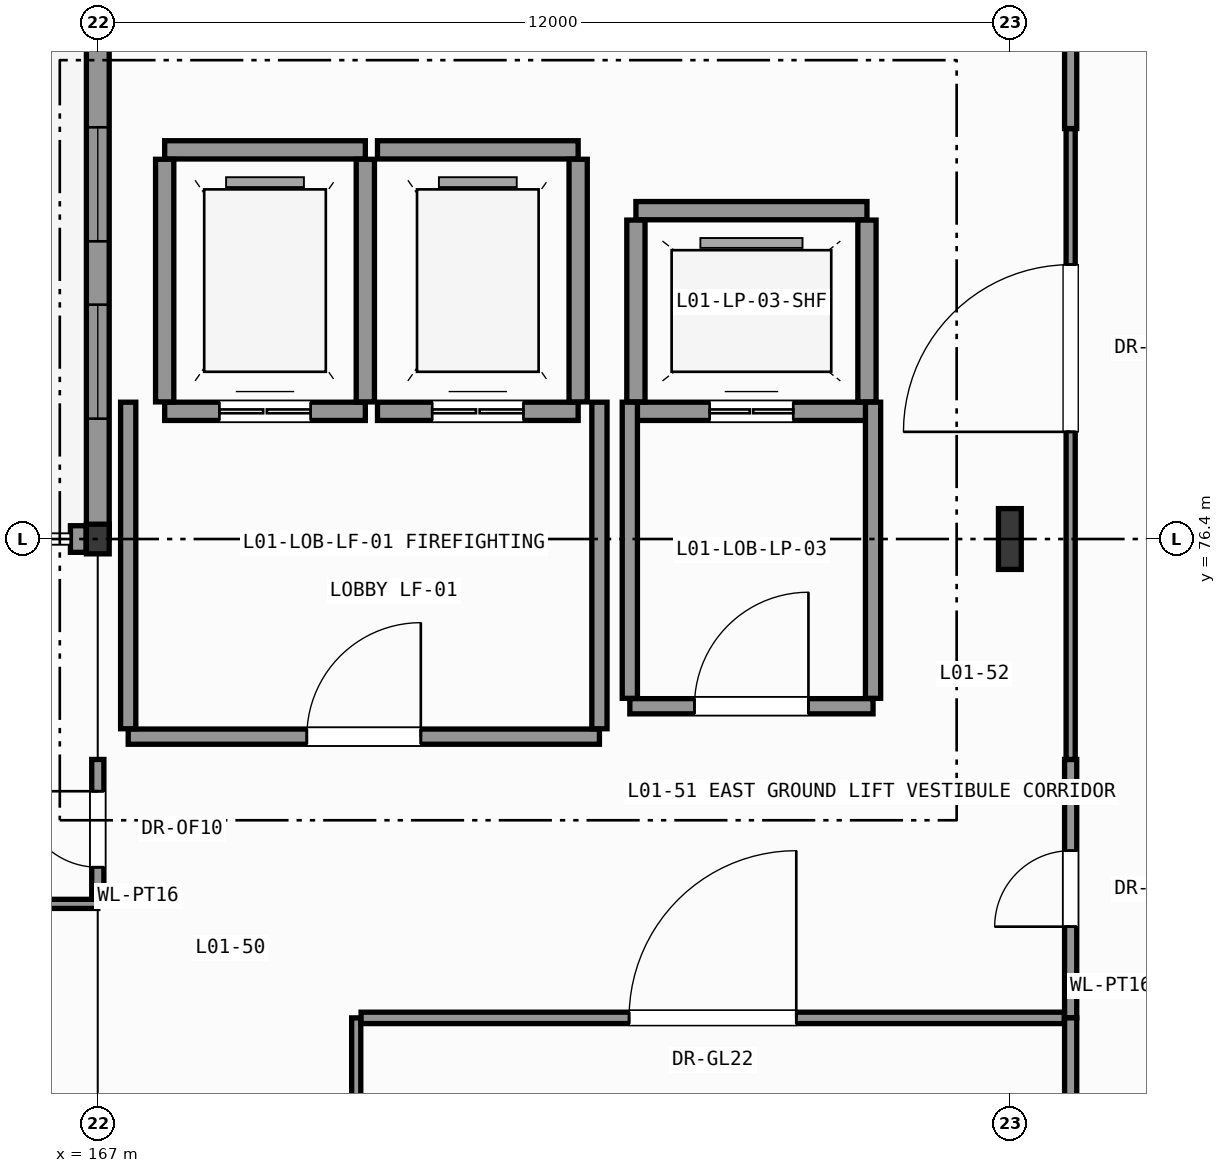
"""IFC4 building model, lengths in metres.
Left out: names, types, materials, properties, quantities, classifications, styles, units other than length and angle.
Written with IfcOpenShell. Run it as: python <this file> out.ifc"""

import sys

from ifc_helpers import new_model, si_unit, direction, frame, frame_2d, origin, origin_2d, place, context, subcontext, project, spatial, rectangle, i_section, extrude, element, fill, save


model = new_model("IFC4")
c1 = context("Model", 3, precision=1e-05, world=origin(), true_north=direction((0.0, 1.0)))
c2 = subcontext(c1, "Body", "Model", "MODEL_VIEW")
j1 = project(units=[si_unit("LENGTHUNIT", "METRE"), si_unit("PLANEANGLEUNIT", "RADIAN")], contexts=[c1])
p1 = place(None, origin())
s1 = spatial("IfcSite", under=j1, at=p1, CompositionType="ELEMENT")
p2 = place(p1, origin())
s2 = spatial("IfcBuilding", under=s1, at=p2, CompositionType="ELEMENT")
p3 = place(p2, origin())
s3 = spatial("IfcBuildingStorey", under=s2, at=p3, CompositionType="ELEMENT", Elevation=0.0)
p4 = place(p3, frame((167.0, 76.4, 0.0), z_axis=(0.0, 0.0, 1.0), x_axis=(1.0, 0.0, 0.0)))
e1 = element("IfcColumn", 1, at=p4, inside=s3, PredefinedType="COLUMN", context=c2, shape_type="SweptSolid", body=[
    extrude(i_section(OverallWidth=0.3, OverallDepth=0.39, WebThickness=0.011, FlangeThickness=0.019, FilletRadius=0.027, at=origin_2d()), origin(), (0.0, 0.0, 1.0), 7.8),
])
p5 = place(p3, frame((179.0, 76.4, 0.0), z_axis=(0.0, 0.0, 1.0), x_axis=(1.0, 0.0, 0.0)))
e2 = element("IfcColumn", 2, at=p5, inside=s3, PredefinedType="COLUMN", context=c2, shape_type="SweptSolid", body=[
    extrude(i_section(OverallWidth=0.3, OverallDepth=0.8, WebThickness=0.018, FlangeThickness=0.033, FilletRadius=0.03, at=origin_2d()), origin(), (0.0, 0.0, 1.0), 7.8),
])
p6 = place(p3, frame((167.0, 76.4, 0.0), z_axis=(0.0, 0.0, 1.0), x_axis=(0.0, 1.0, 0.0)))
e3 = element("IfcWall", 3, at=p6, inside=s3, PredefinedType="SOLIDWALL", context=c2, shape_type="SweptSolid", body=[
    extrude(rectangle(XDim=7.0, YDim=0.3, at=frame_2d((3.5, 0.0))), origin(), (0.0, 0.0, 1.0), 7.235),
])
p7 = place(p6, frame((1.583, 0.0, 0.95)))
e4 = element("IfcOpeningElement", 4, at=p7, cuts=e3, PredefinedType="OPENING", context=c2, shape_type="SweptSolid", body=[
    extrude(rectangle(XDim=1.5, YDim=2.4, at=frame_2d((0.75, 1.2))), frame((0.0, 0.16, 0.0), z_axis=(0.0, -1.0, 0.0), x_axis=(1.0, 0.0, 0.0)), (0.0, 0.0, 1.0), 0.32),
])
p8 = place(p6, frame((3.917, 0.0, 0.95)))
e5 = element("IfcOpeningElement", 5, at=p8, cuts=e3, PredefinedType="OPENING", context=c2, shape_type="SweptSolid", body=[
    extrude(rectangle(XDim=1.5, YDim=2.4, at=frame_2d((0.75, 1.2))), frame((0.0, 0.16, 0.0), z_axis=(0.0, -1.0, 0.0), x_axis=(1.0, 0.0, 0.0)), (0.0, 0.0, 1.0), 0.32),
])
p9 = place(p3, frame((166.846, 76.4, 0.0), z_axis=(0.0, 0.0, 1.0), x_axis=(-1.0, 0.0, 0.0)))
e6 = element("IfcWall", 6, at=p9, inside=s3, PredefinedType="SOLIDWALL", context=c2, shape_type="SweptSolid", body=[
    extrude(rectangle(XDim=0.206, YDim=0.35, at=frame_2d((0.103, 0.0))), origin(), (0.0, 0.0, 1.0), 7.54),
])
p10 = place(p3, frame((167.88, 78.08, 0.0), z_axis=(0.0, 0.0, 1.0), x_axis=(1.0, 0.0, 0.0)))
e7 = element("IfcWall", 7, at=p10, inside=s3, PredefinedType="SHEAR", context=c2, shape_type="SweptSolid", body=[
    extrude(rectangle(XDim=2.64, YDim=0.24, at=frame_2d((1.32, 0.0))), origin(), (0.0, 0.0, 1.0), 7.54),
])
p11 = place(p10, frame((0.72, 0.0, 0.0)))
e8 = element("IfcOpeningElement", 8, at=p11, cuts=e7, PredefinedType="OPENING", context=c2, shape_type="SweptSolid", body=[
    extrude(rectangle(XDim=1.2, YDim=2.2, at=frame_2d((0.6, 1.1))), frame((0.0, 0.13, 0.0), z_axis=(0.0, -1.0, 0.0), x_axis=(1.0, 0.0, 0.0)), (0.0, 0.0, 1.0), 0.26),
])
p12 = place(p3, frame((167.88, 81.52, 0.0), z_axis=(0.0, 0.0, 1.0), x_axis=(1.0, 0.0, 0.0)))
e9 = element("IfcWall", 9, at=p12, inside=s3, PredefinedType="SHEAR", context=c2, shape_type="SweptSolid", body=[
    extrude(rectangle(XDim=2.64, YDim=0.24, at=frame_2d((1.32, 0.0))), origin(), (0.0, 0.0, 1.0), 7.54),
])
for number, where, z_axis, x_axis in (
    (10, (167.88, 78.204, 0.0), (0.0, 0.0, 1.0), (0.0, 1.0, 0.0)),
    (11, (170.52, 78.204, 0.0), (0.0, 0.0, 1.0), (0.0, 1.0, 0.0)),
):
    element("IfcWall", number, at=place(p3, frame(where, z_axis=z_axis, x_axis=x_axis)), inside=s3, PredefinedType="SHEAR", context=c2, shape_type="SweptSolid", body=[
        extrude(rectangle(XDim=3.192, YDim=0.24, at=frame_2d((1.596, 0.0))), origin(), (0.0, 0.0, 1.0), 7.54),
    ])
p13 = place(p3, frame((170.68, 78.08, 0.0), z_axis=(0.0, 0.0, 1.0), x_axis=(1.0, 0.0, 0.0)))
e12 = element("IfcWall", 12, at=p13, inside=s3, PredefinedType="SHEAR", context=c2, shape_type="SweptSolid", body=[
    extrude(rectangle(XDim=2.64, YDim=0.24, at=frame_2d((1.32, 0.0))), origin(), (0.0, 0.0, 1.0), 7.54),
])
p14 = place(p13, frame((0.72, 0.0, 0.0)))
e13 = element("IfcOpeningElement", 13, at=p14, cuts=e12, PredefinedType="OPENING", context=c2, shape_type="SweptSolid", body=[
    extrude(rectangle(XDim=1.2, YDim=2.2, at=frame_2d((0.6, 1.1))), frame((0.0, 0.13, 0.0), z_axis=(0.0, -1.0, 0.0), x_axis=(1.0, 0.0, 0.0)), (0.0, 0.0, 1.0), 0.26),
])
p15 = place(p3, frame((170.68, 81.52, 0.0), z_axis=(0.0, 0.0, 1.0), x_axis=(1.0, 0.0, 0.0)))
e14 = element("IfcWall", 14, at=p15, inside=s3, PredefinedType="SHEAR", context=c2, shape_type="SweptSolid", body=[
    extrude(rectangle(XDim=2.64, YDim=0.24, at=frame_2d((1.32, 0.0))), origin(), (0.0, 0.0, 1.0), 7.54),
])
p16 = place(p3, frame((173.32, 78.204, 0.0), z_axis=(0.0, 0.0, 1.0), x_axis=(0.0, 1.0, 0.0)))
e15 = element("IfcWall", 15, at=p16, inside=s3, PredefinedType="SHEAR", context=c2, shape_type="SweptSolid", body=[
    extrude(rectangle(XDim=3.192, YDim=0.24, at=frame_2d((1.596, 0.0))), origin(), (0.0, 0.0, 1.0), 7.54),
])
p17 = place(p3, frame((174.08, 78.08, 0.0), z_axis=(0.0, 0.0, 1.0), x_axis=(1.0, 0.0, 0.0)))
e16 = element("IfcWall", 16, at=p17, inside=s3, PredefinedType="SHEAR", context=c2, shape_type="SweptSolid", body=[
    extrude(rectangle(XDim=3.04, YDim=0.24, at=frame_2d((1.52, 0.0))), origin(), (0.0, 0.0, 1.0), 7.54),
])
p18 = place(p17, frame((0.97, 0.0, 0.0)))
e17 = element("IfcOpeningElement", 17, at=p18, cuts=e16, PredefinedType="OPENING", context=c2, shape_type="SweptSolid", body=[
    extrude(rectangle(XDim=1.1, YDim=2.2, at=frame_2d((0.55, 1.1))), frame((0.0, 0.13, 0.0), z_axis=(0.0, -1.0, 0.0), x_axis=(1.0, 0.0, 0.0)), (0.0, 0.0, 1.0), 0.26),
])
p19 = place(p3, frame((174.08, 80.72, 0.0), z_axis=(0.0, 0.0, 1.0), x_axis=(1.0, 0.0, 0.0)))
e18 = element("IfcWall", 18, at=p19, inside=s3, PredefinedType="SHEAR", context=c2, shape_type="SweptSolid", body=[
    extrude(rectangle(XDim=3.04, YDim=0.24, at=frame_2d((1.52, 0.0))), origin(), (0.0, 0.0, 1.0), 7.54),
])
for number, where, z_axis, x_axis in (
    (19, (174.08, 78.204, 0.0), (0.0, 0.0, 1.0), (0.0, 1.0, 0.0)),
    (20, (177.12, 78.204, 0.0), (0.0, 0.0, 1.0), (0.0, 1.0, 0.0)),
):
    element("IfcWall", number, at=place(p3, frame(where, z_axis=z_axis, x_axis=x_axis)), inside=s3, PredefinedType="SHEAR", context=c2, shape_type="SweptSolid", body=[
        extrude(rectangle(XDim=2.392, YDim=0.24, at=frame_2d((1.196, 0.0))), origin(), (0.0, 0.0, 1.0), 7.54),
    ])
p20 = place(p3, frame((167.4, 73.8, 0.0), z_axis=(0.0, 0.0, 1.0), x_axis=(1.0, 0.0, 0.0)))
e21 = element("IfcWall", 21, at=p20, inside=s3, PredefinedType="PARTITIONING", context=c2, shape_type="SweptSolid", body=[
    extrude(rectangle(XDim=6.2, YDim=0.2, at=frame_2d((3.1, 0.0))), origin(), (0.0, 0.0, 1.0), 7.165),
])
p21 = place(p20, frame((2.35, 0.0, 0.0)))
e22 = element("IfcOpeningElement", 22, at=p21, cuts=e21, PredefinedType="OPENING", context=c2, shape_type="SweptSolid", body=[
    extrude(rectangle(XDim=1.5, YDim=2.2, at=frame_2d((0.75, 1.1))), frame((0.0, 0.11, 0.0), z_axis=(0.0, -1.0, 0.0), x_axis=(1.0, 0.0, 0.0)), (0.0, 0.0, 1.0), 0.22),
])
for number, where, z_axis, x_axis in (
    (23, (167.4, 73.904, 0.0), (0.0, 0.0, 1.0), (0.0, 1.0, 0.0)),
    (24, (173.6, 73.904, 0.0), (0.0, 0.0, 1.0), (0.0, 1.0, 0.0)),
):
    element("IfcWall", number, at=place(p3, frame(where, z_axis=z_axis, x_axis=x_axis)), inside=s3, PredefinedType="PARTITIONING", context=c2, shape_type="SweptSolid", body=[
        extrude(rectangle(XDim=4.296, YDim=0.2, at=frame_2d((2.148, 0.0))), origin(), (0.0, 0.0, 1.0), 7.54),
    ])
p22 = place(p3, frame((174.0, 74.2, 0.0), z_axis=(0.0, 0.0, 1.0), x_axis=(1.0, 0.0, 0.0)))
e25 = element("IfcWall", 25, at=p22, inside=s3, PredefinedType="PARTITIONING", context=c2, shape_type="SweptSolid", body=[
    extrude(rectangle(XDim=3.2, YDim=0.2, at=frame_2d((1.6, 0.0))), origin(), (0.0, 0.0, 1.0), 7.54),
])
p23 = place(p22, frame((0.85, 0.0, 0.0)))
e26 = element("IfcOpeningElement", 26, at=p23, cuts=e25, PredefinedType="OPENING", context=c2, shape_type="SweptSolid", body=[
    extrude(rectangle(XDim=1.5, YDim=2.2, at=frame_2d((0.75, 1.1))), frame((0.0, 0.11, 0.0), z_axis=(0.0, -1.0, 0.0), x_axis=(1.0, 0.0, 0.0)), (0.0, 0.0, 1.0), 0.22),
])
for number, where, z_axis, x_axis in (
    (27, (174.0, 74.304, 0.0), (0.0, 0.0, 1.0), (0.0, 1.0, 0.0)),
    (28, (177.2, 74.304, 0.0), (0.0, 0.0, 1.0), (0.0, 1.0, 0.0)),
):
    element("IfcWall", number, at=place(p3, frame(where, z_axis=z_axis, x_axis=x_axis)), inside=s3, PredefinedType="PARTITIONING", context=c2, shape_type="SweptSolid", body=[
        extrude(rectangle(XDim=3.896, YDim=0.2, at=frame_2d((1.948, 0.0))), origin(), (0.0, 0.0, 1.0), 7.54),
    ])
p24 = place(p3, frame((126.0, 71.6, 0.0), z_axis=(0.0, 0.0, 1.0), x_axis=(1.0, 0.0, 0.0)))
e29 = element("IfcWall", 29, at=p24, inside=s3, PredefinedType="PARTITIONING", context=c2, shape_type="SweptSolid", body=[
    extrude(rectangle(XDim=41.0, YDim=0.12, at=frame_2d((20.5, 0.0))), origin(), (0.0, 0.0, 1.0), 7.54),
])
p25 = place(p24, frame((19.4, 0.0, 0.0)))
e30 = element("IfcOpeningElement", 30, at=p25, cuts=e29, PredefinedType="OPENING", context=c2, shape_type="SweptSolid", body=[
    extrude(rectangle(XDim=2.2, YDim=2.6, at=frame_2d((1.1, 1.3))), frame((0.0, 0.07, 0.0), z_axis=(0.0, -1.0, 0.0), x_axis=(1.0, 0.0, 0.0)), (0.0, 0.0, 1.0), 0.14),
])
p26 = place(p3, frame((167.0, 71.664, 0.0), z_axis=(0.0, 0.0, 1.0), x_axis=(0.0, 1.0, 0.0)))
e31 = element("IfcWall", 31, at=p26, inside=s3, PredefinedType="PARTITIONING", context=c2, shape_type="SweptSolid", body=[
    extrude(rectangle(XDim=1.836, YDim=0.16, at=frame_2d((0.918, 0.0))), origin(), (0.0, 0.0, 1.0), 7.085),
])
p27 = place(p26, frame((0.418, 0.0, 0.0)))
e32 = element("IfcOpeningElement", 32, at=p27, cuts=e31, PredefinedType="OPENING", context=c2, shape_type="SweptSolid", body=[
    extrude(rectangle(XDim=1.0, YDim=2.15, at=frame_2d((0.5, 1.075))), frame((0.0, 0.09, 0.0), z_axis=(0.0, -1.0, 0.0), x_axis=(1.0, 0.0, 0.0)), (0.0, 0.0, 1.0), 0.18),
])
p28 = place(p3, frame((170.4, 61.279, 0.0), z_axis=(0.0, 0.0, 1.0), x_axis=(0.0, 1.0, 0.0)))
e33 = element("IfcWall", 33, at=p28, inside=s3, PredefinedType="PARTITIONING", context=c2, shape_type="SweptSolid", body=[
    extrude(rectangle(XDim=8.821, YDim=0.12, at=frame_2d((4.411, 0.0))), origin(), (0.0, 0.0, 1.0), 7.54),
])
p29 = place(p28, frame((3.311, 0.0, 0.0)))
e34 = element("IfcOpeningElement", 34, at=p29, cuts=e33, PredefinedType="OPENING", context=c2, shape_type="SweptSolid", body=[
    extrude(rectangle(XDim=2.2, YDim=2.6, at=frame_2d((1.1, 1.3))), frame((0.0, 0.07, 0.0), z_axis=(0.0, -1.0, 0.0), x_axis=(1.0, 0.0, 0.0)), (0.0, 0.0, 1.0), 0.14),
])
p30 = place(p3, frame((179.8, 70.1, 0.0), z_axis=(0.0, 0.0, 1.0), x_axis=(0.0, 1.0, 0.0)))
e35 = element("IfcWall", 35, at=p30, inside=s3, PredefinedType="PARTITIONING", context=c2, shape_type="SweptSolid", body=[
    extrude(rectangle(XDim=3.4, YDim=0.16, at=frame_2d((1.7, 0.0))), origin(), (0.0, 0.0, 1.0), 7.54),
])
p31 = place(p30, frame((1.2, 0.0, 0.0)))
e36 = element("IfcOpeningElement", 36, at=p31, cuts=e35, PredefinedType="OPENING", context=c2, shape_type="SweptSolid", body=[
    extrude(rectangle(XDim=1.0, YDim=2.15, at=frame_2d((0.5, 1.075))), frame((0.0, 0.09, 0.0), z_axis=(0.0, -1.0, 0.0), x_axis=(1.0, 0.0, 0.0)), (0.0, 0.0, 1.0), 0.18),
])
p32 = place(p3, frame((170.464, 70.1, 0.0), z_axis=(0.0, 0.0, 1.0), x_axis=(1.0, 0.0, 0.0)))
e37 = element("IfcWall", 37, at=p32, inside=s3, PredefinedType="PARTITIONING", context=c2, shape_type="SweptSolid", body=[
    extrude(rectangle(XDim=9.252, YDim=0.15, at=frame_2d((4.626, 0.0))), origin(), (0.0, 0.0, 1.0), 7.54),
])
p33 = place(p32, frame((3.526, 0.0, 0.0)))
e38 = element("IfcOpeningElement", 38, at=p33, cuts=e37, PredefinedType="OPENING", context=c2, shape_type="SweptSolid", body=[
    extrude(rectangle(XDim=2.2, YDim=2.6, at=frame_2d((1.1, 1.3))), frame((0.0, 0.085, 0.0), z_axis=(0.0, -1.0, 0.0), x_axis=(1.0, 0.0, 0.0)), (0.0, 0.0, 1.0), 0.17),
])
p34 = place(p3, frame((179.8, 73.5, 0.0), z_axis=(0.0, 0.0, 1.0), x_axis=(0.0, 1.0, 0.0)))
e39 = element("IfcWall", 39, at=p34, inside=s3, PredefinedType="PARTITIONING", context=c2, shape_type="SweptSolid", body=[
    extrude(rectangle(XDim=8.3, YDim=0.12, at=frame_2d((4.15, 0.0))), origin(), (0.0, 0.0, 1.0), 7.54),
])
p35 = place(p34, frame((4.31, 0.0, 0.0)))
e40 = element("IfcOpeningElement", 40, at=p35, cuts=e39, PredefinedType="OPENING", context=c2, shape_type="SweptSolid", body=[
    extrude(rectangle(XDim=2.2, YDim=2.6, at=frame_2d((1.1, 1.3))), frame((0.0, 0.07, 0.0), z_axis=(0.0, -1.0, 0.0), x_axis=(1.0, 0.0, 0.0)), (0.0, 0.0, 1.0), 0.14),
])
p36 = place(p3, frame((179.8, 81.8, 0.0), z_axis=(0.0, 0.0, 1.0), x_axis=(0.0, 1.0, 0.0)))
e41 = element("IfcWall", 41, at=p36, inside=s3, PredefinedType="PARTITIONING", context=c2, shape_type="SweptSolid", body=[
    extrude(rectangle(XDim=3.4, YDim=0.16, at=frame_2d((1.7, 0.0))), origin(), (0.0, 0.0, 1.0), 7.54),
])
p37 = place(p3, frame((179.8, 61.2, 0.0), z_axis=(0.0, 0.0, 1.0), x_axis=(0.0, 1.0, 0.0)))
e42 = element("IfcWall", 42, at=p37, inside=s3, PredefinedType="PARTITIONING", context=c2, shape_type="SweptSolid", body=[
    extrude(rectangle(XDim=8.9, YDim=0.16, at=frame_2d((4.45, 0.0))), origin(), (0.0, 0.0, 1.0), 7.54),
])
p38 = place(p37, frame((0.35, 0.0, 0.0)))
e43 = element("IfcOpeningElement", 43, at=p38, cuts=e42, PredefinedType="OPENING", context=c2, shape_type="SweptSolid", body=[
    extrude(rectangle(XDim=2.2, YDim=2.6, at=frame_2d((1.1, 1.3))), frame((0.0, 0.09, 0.0), z_axis=(0.0, -1.0, 0.0), x_axis=(1.0, 0.0, 0.0)), (0.0, 0.0, 1.0), 0.18),
])
p39 = place(p7, origin())
e44 = element("IfcWindow", 44, at=p39, inside=s3, PartitioningType="SINGLE_PANEL", PredefinedType="WINDOW", context=c2, shape_type="SweptSolid", body=[
    extrude(rectangle(XDim=1.5, YDim=2.4, at=frame_2d((0.75, 1.2))), frame((0.0, 0.03, 0.0), z_axis=(0.0, -1.0, 0.0), x_axis=(1.0, 0.0, 0.0)), (0.0, 0.0, 1.0), 0.06),
])
fill(e4, e44)
p40 = place(p8, origin())
e45 = element("IfcWindow", 45, at=p40, inside=s3, PartitioningType="SINGLE_PANEL", PredefinedType="WINDOW", context=c2, shape_type="SweptSolid", body=[
    extrude(rectangle(XDim=1.5, YDim=2.4, at=frame_2d((0.75, 1.2))), frame((0.0, 0.03, 0.0), z_axis=(0.0, -1.0, 0.0), x_axis=(1.0, 0.0, 0.0)), (0.0, 0.0, 1.0), 0.06),
])
fill(e5, e45)
p41 = place(p11, origin())
e46 = element("IfcDoor", 46, at=p41, inside=s3, OperationType="DOUBLE_DOOR_SLIDING", PredefinedType="DOOR", context=c2, shape_type="SweptSolid", body=[
    extrude(rectangle(XDim=1.2, YDim=2.2, at=frame_2d((0.6, 1.1))), frame((0.0, 0.025, 0.0), z_axis=(0.0, -1.0, 0.0), x_axis=(1.0, 0.0, 0.0)), (0.0, 0.0, 1.0), 0.05),
])
fill(e8, e46)
p42 = place(p14, origin())
e47 = element("IfcDoor", 47, at=p42, inside=s3, OperationType="DOUBLE_DOOR_SLIDING", PredefinedType="DOOR", context=c2, shape_type="SweptSolid", body=[
    extrude(rectangle(XDim=1.2, YDim=2.2, at=frame_2d((0.6, 1.1))), frame((0.0, 0.025, 0.0), z_axis=(0.0, -1.0, 0.0), x_axis=(1.0, 0.0, 0.0)), (0.0, 0.0, 1.0), 0.05),
])
fill(e13, e47)
p43 = place(p18, origin())
e48 = element("IfcDoor", 48, at=p43, inside=s3, OperationType="DOUBLE_DOOR_SLIDING", PredefinedType="DOOR", context=c2, shape_type="SweptSolid", body=[
    extrude(rectangle(XDim=1.1, YDim=2.2, at=frame_2d((0.55, 1.1))), frame((0.0, 0.025, 0.0), z_axis=(0.0, -1.0, 0.0), x_axis=(1.0, 0.0, 0.0)), (0.0, 0.0, 1.0), 0.05),
])
fill(e17, e48)
p44 = place(p21, origin())
e49 = element("IfcDoor", 49, at=p44, inside=s3, OperationType="SINGLE_SWING_RIGHT", PredefinedType="DOOR", context=c2, shape_type="SweptSolid", body=[
    extrude(rectangle(XDim=1.5, YDim=2.2, at=frame_2d((0.75, 1.1))), frame((0.0, 0.025, 0.0), z_axis=(0.0, -1.0, 0.0), x_axis=(1.0, 0.0, 0.0)), (0.0, 0.0, 1.0), 0.05),
])
fill(e22, e49)
p45 = place(p23, origin())
e50 = element("IfcDoor", 50, at=p45, inside=s3, OperationType="SINGLE_SWING_RIGHT", PredefinedType="DOOR", context=c2, shape_type="SweptSolid", body=[
    extrude(rectangle(XDim=1.5, YDim=2.2, at=frame_2d((0.75, 1.1))), frame((0.0, 0.025, 0.0), z_axis=(0.0, -1.0, 0.0), x_axis=(1.0, 0.0, 0.0)), (0.0, 0.0, 1.0), 0.05),
])
fill(e26, e50)
p46 = place(p27, origin())
e51 = element("IfcDoor", 51, at=p46, inside=s3, OperationType="SINGLE_SWING_RIGHT", PredefinedType="DOOR", context=c2, shape_type="SweptSolid", body=[
    extrude(rectangle(XDim=1.0, YDim=2.15, at=frame_2d((0.5, 1.075))), frame((0.0, 0.025, 0.0), z_axis=(0.0, -1.0, 0.0), x_axis=(1.0, 0.0, 0.0)), (0.0, 0.0, 1.0), 0.05),
])
fill(e32, e51)
p47 = place(p31, origin())
e52 = element("IfcDoor", 52, at=p47, inside=s3, OperationType="SINGLE_SWING_LEFT", PredefinedType="DOOR", context=c2, shape_type="SweptSolid", body=[
    extrude(rectangle(XDim=1.0, YDim=2.15, at=frame_2d((0.5, 1.075))), frame((0.0, 0.025, 0.0), z_axis=(0.0, -1.0, 0.0), x_axis=(1.0, 0.0, 0.0)), (0.0, 0.0, 1.0), 0.05),
])
fill(e36, e52)
p48 = place(p33, origin())
e53 = element("IfcDoor", 53, at=p48, inside=s3, OperationType="SINGLE_SWING_RIGHT", PredefinedType="DOOR", context=c2, shape_type="SweptSolid", body=[
    extrude(rectangle(XDim=2.2, YDim=2.6, at=frame_2d((1.1, 1.3))), frame((0.0, 0.025, 0.0), z_axis=(0.0, -1.0, 0.0), x_axis=(1.0, 0.0, 0.0)), (0.0, 0.0, 1.0), 0.05),
])
fill(e38, e53)
p49 = place(p35, origin())
e54 = element("IfcDoor", 54, at=p49, inside=s3, OperationType="SINGLE_SWING_LEFT", PredefinedType="DOOR", context=c2, shape_type="SweptSolid", body=[
    extrude(rectangle(XDim=2.2, YDim=2.6, at=frame_2d((1.1, 1.3))), frame((0.0, 0.025, 0.0), z_axis=(0.0, -1.0, 0.0), x_axis=(1.0, 0.0, 0.0)), (0.0, 0.0, 1.0), 0.05),
])
fill(e40, e54)
save(model, sys.argv[1])
